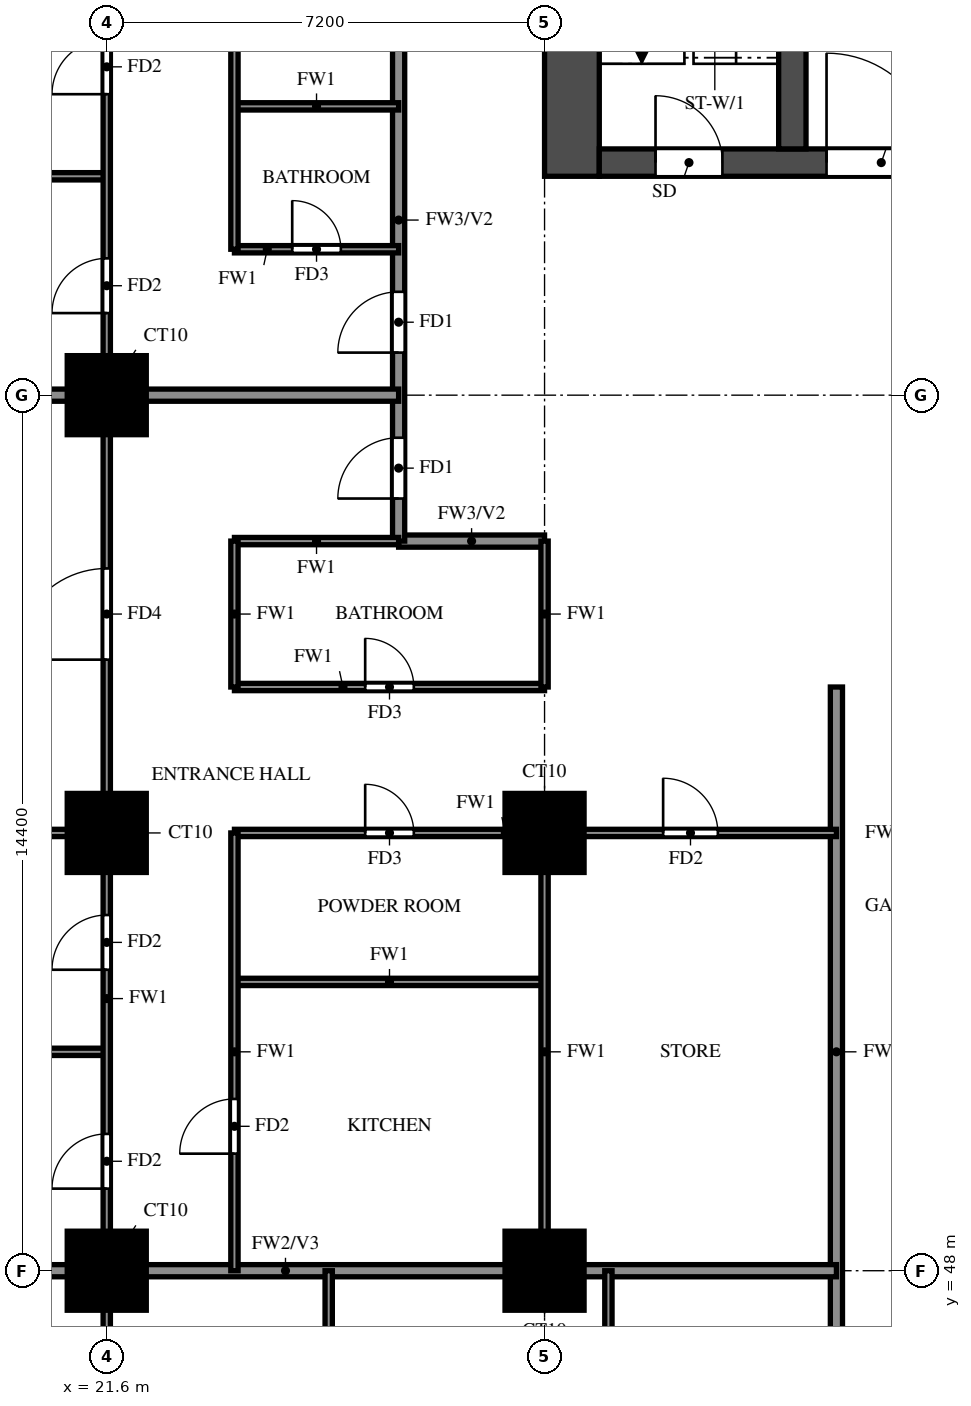
"""IFC4 building model, lengths in metres.
Left out: names, types, materials, properties, quantities, classifications, styles, units other than length and angle.
Written with IfcOpenShell. Run it as: python <this file> out.ifc"""

import sys

from ifc_helpers import new_model, si_unit, direction, frame, frame_2d, origin, origin_2d, place, context, subcontext, project, spatial, rectangle, extrude, source, transform, mapped, element, fill, save


model = new_model("IFC4")
c1 = context("Model", 3, precision=1e-05, world=origin(), true_north=direction((0.0, 1.0)))
c2 = subcontext(c1, "Body", "Model", "MODEL_VIEW")
j1 = project(units=[si_unit("LENGTHUNIT", "METRE"), si_unit("PLANEANGLEUNIT", "RADIAN")], contexts=[c1])
p1 = place(None, origin())
s1 = spatial("IfcSite", under=j1, at=p1, CompositionType="ELEMENT")
p2 = place(p1, origin())
s2 = spatial("IfcBuilding", under=s1, at=p2, CompositionType="ELEMENT")
p3 = place(p2, frame((0.0, 0.0, 62.0)))
s3 = spatial("IfcBuildingStorey", under=s2, at=p3, CompositionType="ELEMENT", Elevation=62.0)
m1 = source(origin(), c2, "Body", "SweptSolid", [
    extrude(rectangle(XDim=1.3, YDim=1.3, at=origin_2d()), origin(), (0.0, 0.0, 1.0), 3.18),
])
for number, where, z_axis, x_axis in (
    (1, (21.6, 48.0, 0.0), (0.0, 0.0, 1.0), (1.0, 0.0, 0.0)),
    (2, (28.8, 48.0, 0.0), (0.0, 0.0, 1.0), (1.0, 0.0, 0.0)),
    (3, (21.6, 55.2, 0.0), (0.0, 0.0, 1.0), (1.0, 0.0, 0.0)),
    (4, (28.8, 55.2, 0.0), (0.0, 0.0, 1.0), (1.0, 0.0, 0.0)),
    (5, (21.6, 62.4, 0.0), (0.0, 0.0, 1.0), (1.0, 0.0, 0.0)),
):
    element("IfcColumn", number, at=place(p3, frame(where, z_axis=z_axis, x_axis=x_axis)), inside=s3, PredefinedType="COLUMN", context=c2, shape_type="MappedRepresentation", body=[
        mapped(m1, transform((0.0, 0.0, 0.0))),
    ])
p4 = place(p3, frame((29.25, 66.0, 0.0), z_axis=(0.0, 0.0, 1.0), x_axis=(0.0, 1.0, 0.0)))
e6 = element("IfcWall", 6, at=p4, inside=s3, PredefinedType="SHEAR", context=c2, shape_type="SweptSolid", body=[
    extrude(rectangle(XDim=12.0, YDim=0.9, at=frame_2d((6.0, 0.0))), origin(), (0.0, 0.0, 1.0), 3.18),
])
p5 = place(p3, frame((29.7, 66.225, 0.0), z_axis=(0.0, 0.0, 1.0), x_axis=(1.0, 0.0, 0.0)))
e7 = element("IfcWall", 7, at=p5, inside=s3, PredefinedType="SHEAR", context=c2, shape_type="SweptSolid", body=[
    extrude(rectangle(XDim=41.4, YDim=0.45, at=frame_2d((20.7, 0.0))), origin(), (0.0, 0.0, 1.0), 3.18),
])
p6 = place(p5, frame((0.925, 0.0, 0.0)))
e8 = element("IfcOpeningElement", 8, at=p6, cuts=e7, PredefinedType="OPENING", context=c2, shape_type="SweptSolid", body=[
    extrude(rectangle(XDim=1.1, YDim=2.1, at=frame_2d((0.55, 1.05))), frame((0.0, 0.235, 0.0), z_axis=(0.0, -1.0, 0.0), x_axis=(1.0, 0.0, 0.0)), (0.0, 0.0, 1.0), 0.47),
])
p7 = place(p5, frame((3.738, 0.0, 0.0)))
e9 = element("IfcOpeningElement", 9, at=p7, cuts=e7, PredefinedType="OPENING", context=c2, shape_type="SweptSolid", body=[
    extrude(rectangle(XDim=1.8, YDim=2.1, at=frame_2d((0.9, 1.05))), frame((0.0, 0.235, 0.0), z_axis=(0.0, -1.0, 0.0), x_axis=(1.0, 0.0, 0.0)), (0.0, 0.0, 1.0), 0.47),
])
p8 = place(p3, frame((32.875, 66.45, 0.0), z_axis=(0.0, 0.0, 1.0), x_axis=(0.0, 1.0, 0.0)))
e10 = element("IfcWall", 10, at=p8, inside=s3, PredefinedType="SHEAR", context=c2, shape_type="SweptSolid", body=[
    extrude(rectangle(XDim=10.65, YDim=0.45, at=frame_2d((5.325, 0.0))), origin(), (0.0, 0.0, 1.0), 3.18),
])
p9 = place(p3, frame((26.4, 60.0, 0.0), z_axis=(0.0, 0.0, 1.0), x_axis=(1.0, 0.0, 0.0)))
e11 = element("IfcWall", 11, at=p9, inside=s3, PredefinedType="SOLIDWALL", context=c2, shape_type="SweptSolid", body=[
    extrude(rectangle(XDim=2.4, YDim=0.2, at=frame_2d((1.2, 0.0))), origin(), (0.0, 0.0, 1.0), 3.18),
])
p10 = place(p3, frame((26.4, 60.0, 0.0), z_axis=(0.0, 0.0, 1.0), x_axis=(0.0, 1.0, 0.0)))
e12 = element("IfcWall", 12, at=p10, inside=s3, PredefinedType="SOLIDWALL", context=c2, shape_type="SweptSolid", body=[
    extrude(rectangle(XDim=9.6, YDim=0.2, at=frame_2d((4.8, 0.0))), origin(), (0.0, 0.0, 1.0), 3.18),
])
p11 = place(p10, frame((0.7, 0.0, 0.0)))
e13 = element("IfcOpeningElement", 13, at=p11, cuts=e12, PredefinedType="OPENING", context=c2, shape_type="SweptSolid", body=[
    extrude(rectangle(XDim=1.0, YDim=2.1, at=frame_2d((0.5, 1.05))), frame((0.0, 0.11, 0.0), z_axis=(0.0, -1.0, 0.0), x_axis=(1.0, 0.0, 0.0)), (0.0, 0.0, 1.0), 0.22),
])
p12 = place(p10, frame((3.1, 0.0, 0.0)))
e14 = element("IfcOpeningElement", 14, at=p12, cuts=e12, PredefinedType="OPENING", context=c2, shape_type="SweptSolid", body=[
    extrude(rectangle(XDim=1.0, YDim=2.1, at=frame_2d((0.5, 1.05))), frame((0.0, 0.11, 0.0), z_axis=(0.0, -1.0, 0.0), x_axis=(1.0, 0.0, 0.0)), (0.0, 0.0, 1.0), 0.22),
])
p13 = place(p3, frame((33.6, 45.6, 0.0), z_axis=(0.0, 0.0, 1.0), x_axis=(0.0, 1.0, 0.0)))
e15 = element("IfcWall", 15, at=p13, inside=s3, PredefinedType="SOLIDWALL", context=c2, shape_type="SweptSolid", body=[
    extrude(rectangle(XDim=12.0, YDim=0.2, at=frame_2d((6.0, 0.0))), origin(), (0.0, 0.0, 1.0), 3.18),
])
p14 = place(p3, frame((14.525, 48.0, 0.0), z_axis=(0.0, 0.0, 1.0), x_axis=(1.0, 0.0, 0.0)))
e16 = element("IfcWall", 16, at=p14, inside=s3, PredefinedType="SOLIDWALL", context=c2, shape_type="SweptSolid", body=[
    extrude(rectangle(XDim=19.075, YDim=0.2, at=frame_2d((9.538, 0.0))), origin(), (0.0, 0.0, 1.0), 3.18),
])
p15 = place(p3, frame((14.525, 62.4, 0.0), z_axis=(0.0, 0.0, 1.0), x_axis=(1.0, 0.0, 0.0)))
e17 = element("IfcWall", 17, at=p15, inside=s3, PredefinedType="SOLIDWALL", context=c2, shape_type="SweptSolid", body=[
    extrude(rectangle(XDim=11.875, YDim=0.2, at=frame_2d((5.938, 0.0))), origin(), (0.0, 0.0, 1.0), 3.18),
])
p16 = place(p3, frame((14.525, 51.6, 0.0), z_axis=(0.0, 0.0, 1.0), x_axis=(1.0, 0.0, 0.0)))
e18 = element("IfcWall", 18, at=p16, inside=s3, PredefinedType="PARTITIONING", context=c2, shape_type="SweptSolid", body=[
    extrude(rectangle(XDim=7.075, YDim=0.12, at=frame_2d((3.538, 0.0))), origin(), (0.0, 0.0, 1.0), 2.28),
])
p17 = place(p3, frame((23.7, 52.75, 0.0), z_axis=(0.0, 0.0, 1.0), x_axis=(1.0, 0.0, 0.0)))
e19 = element("IfcWall", 19, at=p17, inside=s3, PredefinedType="PARTITIONING", context=c2, shape_type="SweptSolid", body=[
    extrude(rectangle(XDim=5.1, YDim=0.12, at=frame_2d((2.55, 0.0))), origin(), (0.0, 0.0, 1.0), 3.18),
])
p18 = place(p3, frame((14.525, 55.2, 0.0), z_axis=(0.0, 0.0, 1.0), x_axis=(1.0, 0.0, 0.0)))
e20 = element("IfcWall", 20, at=p18, inside=s3, PredefinedType="PARTITIONING", context=c2, shape_type="SweptSolid", body=[
    extrude(rectangle(XDim=7.075, YDim=0.12, at=frame_2d((3.538, 0.0))), origin(), (0.0, 0.0, 1.0), 3.18),
])
p19 = place(p3, frame((23.7, 55.2, 0.0), z_axis=(0.0, 0.0, 1.0), x_axis=(1.0, 0.0, 0.0)))
e21 = element("IfcWall", 21, at=p19, inside=s3, PredefinedType="PARTITIONING", context=c2, shape_type="SweptSolid", body=[
    extrude(rectangle(XDim=9.9, YDim=0.12, at=frame_2d((4.95, 0.0))), origin(), (0.0, 0.0, 1.0), 3.18),
])
p20 = place(p19, frame((2.15, 0.0, 0.0)))
e22 = element("IfcOpeningElement", 22, at=p20, cuts=e21, PredefinedType="OPENING", context=c2, shape_type="SweptSolid", body=[
    extrude(rectangle(XDim=0.8, YDim=2.1, at=frame_2d((0.4, 1.05))), frame((0.0, 0.07, 0.0), z_axis=(0.0, -1.0, 0.0), x_axis=(1.0, 0.0, 0.0)), (0.0, 0.0, 1.0), 0.14),
])
p21 = place(p19, frame((7.05, 0.0, 0.0)))
e23 = element("IfcOpeningElement", 23, at=p21, cuts=e21, PredefinedType="OPENING", context=c2, shape_type="SweptSolid", body=[
    extrude(rectangle(XDim=0.9, YDim=2.1, at=frame_2d((0.45, 1.05))), frame((0.0, 0.07, 0.0), z_axis=(0.0, -1.0, 0.0), x_axis=(1.0, 0.0, 0.0)), (0.0, 0.0, 1.0), 0.14),
])
p22 = place(p3, frame((23.7, 57.6, 0.0), z_axis=(0.0, 0.0, 1.0), x_axis=(1.0, 0.0, 0.0)))
e24 = element("IfcWall", 24, at=p22, inside=s3, PredefinedType="PARTITIONING", context=c2, shape_type="SweptSolid", body=[
    extrude(rectangle(XDim=5.1, YDim=0.12, at=frame_2d((2.55, 0.0))), origin(), (0.0, 0.0, 1.0), 3.18),
])
p23 = place(p22, frame((2.15, 0.0, 0.0)))
e25 = element("IfcOpeningElement", 25, at=p23, cuts=e24, PredefinedType="OPENING", context=c2, shape_type="SweptSolid", body=[
    extrude(rectangle(XDim=0.8, YDim=2.1, at=frame_2d((0.4, 1.05))), frame((0.0, 0.07, 0.0), z_axis=(0.0, -1.0, 0.0), x_axis=(1.0, 0.0, 0.0)), (0.0, 0.0, 1.0), 0.14),
])
p24 = place(p3, frame((23.7, 60.0, 0.0), z_axis=(0.0, 0.0, 1.0), x_axis=(1.0, 0.0, 0.0)))
e26 = element("IfcWall", 26, at=p24, inside=s3, PredefinedType="PARTITIONING", context=c2, shape_type="SweptSolid", body=[
    extrude(rectangle(XDim=2.7, YDim=0.12, at=frame_2d((1.35, 0.0))), origin(), (0.0, 0.0, 1.0), 3.18),
])
p25 = place(p3, frame((23.7, 64.8, 0.0), z_axis=(0.0, 0.0, 1.0), x_axis=(1.0, 0.0, 0.0)))
e27 = element("IfcWall", 27, at=p25, inside=s3, PredefinedType="PARTITIONING", context=c2, shape_type="SweptSolid", body=[
    extrude(rectangle(XDim=2.7, YDim=0.12, at=frame_2d((1.35, 0.0))), origin(), (0.0, 0.0, 1.0), 3.18),
])
p26 = place(p25, frame((0.95, 0.0, 0.0)))
e28 = element("IfcOpeningElement", 28, at=p26, cuts=e27, PredefinedType="OPENING", context=c2, shape_type="SweptSolid", body=[
    extrude(rectangle(XDim=0.8, YDim=2.1, at=frame_2d((0.4, 1.05))), frame((0.0, 0.07, 0.0), z_axis=(0.0, -1.0, 0.0), x_axis=(1.0, 0.0, 0.0)), (0.0, 0.0, 1.0), 0.14),
])
p27 = place(p3, frame((14.525, 66.0, 0.0), z_axis=(0.0, 0.0, 1.0), x_axis=(1.0, 0.0, 0.0)))
e29 = element("IfcWall", 29, at=p27, inside=s3, PredefinedType="PARTITIONING", context=c2, shape_type="SweptSolid", body=[
    extrude(rectangle(XDim=7.075, YDim=0.12, at=frame_2d((3.538, 0.0))), origin(), (0.0, 0.0, 1.0), 2.28),
])
p28 = place(p3, frame((23.7, 67.15, 0.0), z_axis=(0.0, 0.0, 1.0), x_axis=(1.0, 0.0, 0.0)))
e30 = element("IfcWall", 30, at=p28, inside=s3, PredefinedType="PARTITIONING", context=c2, shape_type="SweptSolid", body=[
    extrude(rectangle(XDim=2.7, YDim=0.12, at=frame_2d((1.35, 0.0))), origin(), (0.0, 0.0, 1.0), 3.18),
])
p29 = place(p3, frame((21.6, 33.725, 0.0), z_axis=(0.0, 0.0, 1.0), x_axis=(0.0, 1.0, 0.0)))
e31 = element("IfcWall", 31, at=p29, inside=s3, PredefinedType="PARTITIONING", context=c2, shape_type="SweptSolid", body=[
    extrude(rectangle(XDim=39.475, YDim=0.12, at=frame_2d((19.737, 0.0))), origin(), (0.0, 0.0, 1.0), 3.18),
])
p30 = place(p29, frame((7.775, 0.0, 0.0)))
e32 = element("IfcOpeningElement", 32, at=p30, cuts=e31, PredefinedType="OPENING", context=c2, shape_type="SweptSolid", body=[
    extrude(rectangle(XDim=0.9, YDim=2.1, at=frame_2d((0.45, 1.05))), frame((0.0, 0.07, 0.0), z_axis=(0.0, -1.0, 0.0), x_axis=(1.0, 0.0, 0.0)), (0.0, 0.0, 1.0), 0.14),
])
p31 = place(p29, frame((15.625, 0.0, 0.0)))
e33 = element("IfcOpeningElement", 33, at=p31, cuts=e31, PredefinedType="OPENING", context=c2, shape_type="SweptSolid", body=[
    extrude(rectangle(XDim=0.9, YDim=2.1, at=frame_2d((0.45, 1.05))), frame((0.0, 0.07, 0.0), z_axis=(0.0, -1.0, 0.0), x_axis=(1.0, 0.0, 0.0)), (0.0, 0.0, 1.0), 0.14),
])
p32 = place(p29, frame((19.225, 0.0, 0.0)))
e34 = element("IfcOpeningElement", 34, at=p32, cuts=e31, PredefinedType="OPENING", context=c2, shape_type="SweptSolid", body=[
    extrude(rectangle(XDim=0.9, YDim=2.1, at=frame_2d((0.45, 1.05))), frame((0.0, 0.07, 0.0), z_axis=(0.0, -1.0, 0.0), x_axis=(1.0, 0.0, 0.0)), (0.0, 0.0, 1.0), 0.14),
])
p33 = place(p29, frame((24.325, 0.0, 0.0)))
e35 = element("IfcOpeningElement", 35, at=p33, cuts=e31, PredefinedType="OPENING", context=c2, shape_type="SweptSolid", body=[
    extrude(rectangle(XDim=1.5, YDim=2.1, at=frame_2d((0.75, 1.05))), frame((0.0, 0.07, 0.0), z_axis=(0.0, -1.0, 0.0), x_axis=(1.0, 0.0, 0.0)), (0.0, 0.0, 1.0), 0.14),
])
p34 = place(p29, frame((30.025, 0.0, 0.0)))
e36 = element("IfcOpeningElement", 36, at=p34, cuts=e31, PredefinedType="OPENING", context=c2, shape_type="SweptSolid", body=[
    extrude(rectangle(XDim=0.9, YDim=2.1, at=frame_2d((0.45, 1.05))), frame((0.0, 0.07, 0.0), z_axis=(0.0, -1.0, 0.0), x_axis=(1.0, 0.0, 0.0)), (0.0, 0.0, 1.0), 0.14),
])
p35 = place(p29, frame((33.625, 0.0, 0.0)))
e37 = element("IfcOpeningElement", 37, at=p35, cuts=e31, PredefinedType="OPENING", context=c2, shape_type="SweptSolid", body=[
    extrude(rectangle(XDim=0.9, YDim=2.1, at=frame_2d((0.45, 1.05))), frame((0.0, 0.07, 0.0), z_axis=(0.0, -1.0, 0.0), x_axis=(1.0, 0.0, 0.0)), (0.0, 0.0, 1.0), 0.14),
])
p36 = place(p29, frame((37.225, 0.0, 0.0)))
e38 = element("IfcOpeningElement", 38, at=p36, cuts=e31, PredefinedType="OPENING", context=c2, shape_type="SweptSolid", body=[
    extrude(rectangle(XDim=0.9, YDim=2.1, at=frame_2d((0.45, 1.05))), frame((0.0, 0.07, 0.0), z_axis=(0.0, -1.0, 0.0), x_axis=(1.0, 0.0, 0.0)), (0.0, 0.0, 1.0), 0.14),
])
p37 = place(p3, frame((23.7, 48.0, 0.0), z_axis=(0.0, 0.0, 1.0), x_axis=(0.0, 1.0, 0.0)))
e39 = element("IfcWall", 39, at=p37, inside=s3, PredefinedType="PARTITIONING", context=c2, shape_type="SweptSolid", body=[
    extrude(rectangle(XDim=7.2, YDim=0.12, at=frame_2d((3.6, 0.0))), origin(), (0.0, 0.0, 1.0), 3.18),
])
p38 = place(p37, frame((1.925, 0.0, 0.0)))
e40 = element("IfcOpeningElement", 40, at=p38, cuts=e39, PredefinedType="OPENING", context=c2, shape_type="SweptSolid", body=[
    extrude(rectangle(XDim=0.9, YDim=2.1, at=frame_2d((0.45, 1.05))), frame((0.0, 0.07, 0.0), z_axis=(0.0, -1.0, 0.0), x_axis=(1.0, 0.0, 0.0)), (0.0, 0.0, 1.0), 0.14),
])
p39 = place(p3, frame((23.7, 57.6, 0.0), z_axis=(0.0, 0.0, 1.0), x_axis=(0.0, 1.0, 0.0)))
e41 = element("IfcWall", 41, at=p39, inside=s3, PredefinedType="PARTITIONING", context=c2, shape_type="SweptSolid", body=[
    extrude(rectangle(XDim=2.4, YDim=0.12, at=frame_2d((1.2, 0.0))), origin(), (0.0, 0.0, 1.0), 3.18),
])
p40 = place(p3, frame((23.7, 64.8, 0.0), z_axis=(0.0, 0.0, 1.0), x_axis=(0.0, 1.0, 0.0)))
e42 = element("IfcWall", 42, at=p40, inside=s3, PredefinedType="PARTITIONING", context=c2, shape_type="SweptSolid", body=[
    extrude(rectangle(XDim=8.4, YDim=0.12, at=frame_2d((4.2, 0.0))), origin(), (0.0, 0.0, 1.0), 3.18),
])
p41 = place(p40, frame((4.925, 0.0, 0.0)))
e43 = element("IfcOpeningElement", 43, at=p41, cuts=e42, PredefinedType="OPENING", context=c2, shape_type="SweptSolid", body=[
    extrude(rectangle(XDim=0.9, YDim=2.1, at=frame_2d((0.45, 1.05))), frame((0.0, 0.07, 0.0), z_axis=(0.0, -1.0, 0.0), x_axis=(1.0, 0.0, 0.0)), (0.0, 0.0, 1.0), 0.14),
])
p42 = place(p3, frame((25.25, 42.9, 0.0), z_axis=(0.0, 0.0, 1.0), x_axis=(0.0, 1.0, 0.0)))
e44 = element("IfcWall", 44, at=p42, inside=s3, PredefinedType="PARTITIONING", context=c2, shape_type="SweptSolid", body=[
    extrude(rectangle(XDim=5.1, YDim=0.12, at=frame_2d((2.55, 0.0))), origin(), (0.0, 0.0, 1.0), 3.18),
])
p43 = place(p3, frame((28.8, 48.0, 0.0), z_axis=(0.0, 0.0, 1.0), x_axis=(0.0, 1.0, 0.0)))
e45 = element("IfcWall", 45, at=p43, inside=s3, PredefinedType="PARTITIONING", context=c2, shape_type="SweptSolid", body=[
    extrude(rectangle(XDim=7.2, YDim=0.12, at=frame_2d((3.6, 0.0))), origin(), (0.0, 0.0, 1.0), 3.18),
])
p44 = place(p3, frame((28.8, 57.6, 0.0), z_axis=(0.0, 0.0, 1.0), x_axis=(0.0, 1.0, 0.0)))
e46 = element("IfcWall", 46, at=p44, inside=s3, PredefinedType="PARTITIONING", context=c2, shape_type="SweptSolid", body=[
    extrude(rectangle(XDim=2.4, YDim=0.12, at=frame_2d((1.2, 0.0))), origin(), (0.0, 0.0, 1.0), 3.18),
])
p45 = place(p3, frame((29.85, 42.9, 0.0), z_axis=(0.0, 0.0, 1.0), x_axis=(0.0, 1.0, 0.0)))
e47 = element("IfcWall", 47, at=p45, inside=s3, PredefinedType="PARTITIONING", context=c2, shape_type="SweptSolid", body=[
    extrude(rectangle(XDim=5.1, YDim=0.12, at=frame_2d((2.55, 0.0))), origin(), (0.0, 0.0, 1.0), 3.18),
])
p46 = place(p6, origin())
e48 = element("IfcDoor", 48, at=p46, inside=s3, OperationType="SINGLE_SWING_LEFT", PredefinedType="DOOR", context=c2, shape_type="SweptSolid", body=[
    extrude(rectangle(XDim=1.1, YDim=2.1, at=frame_2d((0.55, 1.05))), frame((0.0, 0.025, 0.0), z_axis=(0.0, -1.0, 0.0), x_axis=(1.0, 0.0, 0.0)), (0.0, 0.0, 1.0), 0.05),
])
fill(e8, e48)
p47 = place(p7, origin())
e49 = element("IfcDoor", 49, at=p47, inside=s3, OperationType="DOUBLE_DOOR_SINGLE_SWING", PredefinedType="DOOR", context=c2, shape_type="SweptSolid", body=[
    extrude(rectangle(XDim=1.8, YDim=2.1, at=frame_2d((0.9, 1.05))), frame((0.0, 0.025, 0.0), z_axis=(0.0, -1.0, 0.0), x_axis=(1.0, 0.0, 0.0)), (0.0, 0.0, 1.0), 0.05),
])
fill(e9, e49)
p48 = place(p11, origin())
e50 = element("IfcDoor", 50, at=p48, inside=s3, OperationType="SINGLE_SWING_LEFT", PredefinedType="DOOR", context=c2, shape_type="SweptSolid", body=[
    extrude(rectangle(XDim=1.0, YDim=2.1, at=frame_2d((0.5, 1.05))), frame((0.0, 0.025, 0.0), z_axis=(0.0, -1.0, 0.0), x_axis=(1.0, 0.0, 0.0)), (0.0, 0.0, 1.0), 0.05),
])
fill(e13, e50)
p49 = place(p31, origin())
e51 = element("IfcDoor", 51, at=p49, inside=s3, OperationType="SINGLE_SWING_RIGHT", PredefinedType="DOOR", context=c2, shape_type="SweptSolid", body=[
    extrude(rectangle(XDim=0.9, YDim=2.1, at=frame_2d((0.45, 1.05))), frame((0.0, 0.025, 0.0), z_axis=(0.0, -1.0, 0.0), x_axis=(1.0, 0.0, 0.0)), (0.0, 0.0, 1.0), 0.05),
])
fill(e33, e51)
p50 = place(p32, origin())
e52 = element("IfcDoor", 52, at=p50, inside=s3, OperationType="SINGLE_SWING_LEFT", PredefinedType="DOOR", context=c2, shape_type="SweptSolid", body=[
    extrude(rectangle(XDim=0.9, YDim=2.1, at=frame_2d((0.45, 1.05))), frame((0.0, 0.025, 0.0), z_axis=(0.0, -1.0, 0.0), x_axis=(1.0, 0.0, 0.0)), (0.0, 0.0, 1.0), 0.05),
])
fill(e34, e52)
p51 = place(p33, origin())
e53 = element("IfcDoor", 53, at=p51, inside=s3, OperationType="SINGLE_SWING_LEFT", PredefinedType="DOOR", context=c2, shape_type="SweptSolid", body=[
    extrude(rectangle(XDim=1.5, YDim=2.1, at=frame_2d((0.75, 1.05))), frame((0.0, 0.025, 0.0), z_axis=(0.0, -1.0, 0.0), x_axis=(1.0, 0.0, 0.0)), (0.0, 0.0, 1.0), 0.05),
])
fill(e35, e53)
p52 = place(p38, origin())
e54 = element("IfcDoor", 54, at=p52, inside=s3, OperationType="SINGLE_SWING_RIGHT", PredefinedType="DOOR", context=c2, shape_type="SweptSolid", body=[
    extrude(rectangle(XDim=0.9, YDim=2.1, at=frame_2d((0.45, 1.05))), frame((0.0, 0.025, 0.0), z_axis=(0.0, -1.0, 0.0), x_axis=(1.0, 0.0, 0.0)), (0.0, 0.0, 1.0), 0.05),
])
fill(e40, e54)
p53 = place(p20, origin())
e55 = element("IfcDoor", 55, at=p53, inside=s3, OperationType="SINGLE_SWING_LEFT", PredefinedType="DOOR", context=c2, shape_type="SweptSolid", body=[
    extrude(rectangle(XDim=0.8, YDim=2.1, at=frame_2d((0.4, 1.05))), frame((0.0, 0.025, 0.0), z_axis=(0.0, -1.0, 0.0), x_axis=(1.0, 0.0, 0.0)), (0.0, 0.0, 1.0), 0.05),
])
fill(e22, e55)
p54 = place(p23, origin())
e56 = element("IfcDoor", 56, at=p54, inside=s3, OperationType="SINGLE_SWING_LEFT", PredefinedType="DOOR", context=c2, shape_type="SweptSolid", body=[
    extrude(rectangle(XDim=0.8, YDim=2.1, at=frame_2d((0.4, 1.05))), frame((0.0, 0.025, 0.0), z_axis=(0.0, -1.0, 0.0), x_axis=(1.0, 0.0, 0.0)), (0.0, 0.0, 1.0), 0.05),
])
fill(e25, e56)
p55 = place(p21, origin())
e57 = element("IfcDoor", 57, at=p55, inside=s3, OperationType="SINGLE_SWING_RIGHT", PredefinedType="DOOR", context=c2, shape_type="SweptSolid", body=[
    extrude(rectangle(XDim=0.9, YDim=2.1, at=frame_2d((0.45, 1.05))), frame((0.0, 0.025, 0.0), z_axis=(0.0, -1.0, 0.0), x_axis=(1.0, 0.0, 0.0)), (0.0, 0.0, 1.0), 0.05),
])
fill(e23, e57)
p56 = place(p12, origin())
e58 = element("IfcDoor", 58, at=p56, inside=s3, OperationType="SINGLE_SWING_LEFT", PredefinedType="DOOR", context=c2, shape_type="SweptSolid", body=[
    extrude(rectangle(XDim=1.0, YDim=2.1, at=frame_2d((0.5, 1.05))), frame((0.0, 0.025, 0.0), z_axis=(0.0, -1.0, 0.0), x_axis=(1.0, 0.0, 0.0)), (0.0, 0.0, 1.0), 0.05),
])
fill(e14, e58)
p57 = place(p34, origin())
e59 = element("IfcDoor", 59, at=p57, inside=s3, OperationType="SINGLE_SWING_RIGHT", PredefinedType="DOOR", context=c2, shape_type="SweptSolid", body=[
    extrude(rectangle(XDim=0.9, YDim=2.1, at=frame_2d((0.45, 1.05))), frame((0.0, 0.025, 0.0), z_axis=(0.0, -1.0, 0.0), x_axis=(1.0, 0.0, 0.0)), (0.0, 0.0, 1.0), 0.05),
])
fill(e36, e59)
p58 = place(p35, origin())
e60 = element("IfcDoor", 60, at=p58, inside=s3, OperationType="SINGLE_SWING_LEFT", PredefinedType="DOOR", context=c2, shape_type="SweptSolid", body=[
    extrude(rectangle(XDim=0.9, YDim=2.1, at=frame_2d((0.45, 1.05))), frame((0.0, 0.025, 0.0), z_axis=(0.0, -1.0, 0.0), x_axis=(1.0, 0.0, 0.0)), (0.0, 0.0, 1.0), 0.05),
])
fill(e37, e60)
p59 = place(p26, origin())
e61 = element("IfcDoor", 61, at=p59, inside=s3, OperationType="SINGLE_SWING_LEFT", PredefinedType="DOOR", context=c2, shape_type="SweptSolid", body=[
    extrude(rectangle(XDim=0.8, YDim=2.1, at=frame_2d((0.4, 1.05))), frame((0.0, 0.025, 0.0), z_axis=(0.0, -1.0, 0.0), x_axis=(1.0, 0.0, 0.0)), (0.0, 0.0, 1.0), 0.05),
])
fill(e28, e61)
save(model, sys.argv[1])
